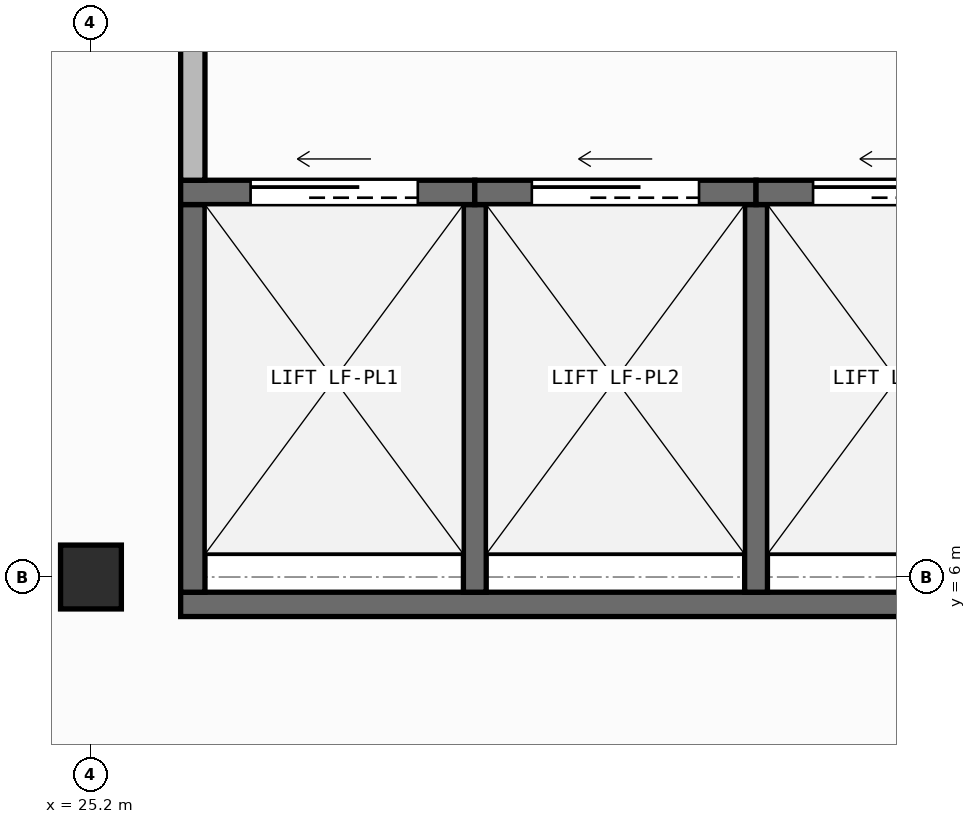
"""IFC4 building model, lengths in metres.
Left out: names, types, materials, properties, quantities, classifications, styles, units other than length and angle.
Written with IfcOpenShell. Run it as: python <this file> out.ifc"""

import sys

from ifc_helpers import new_model, si_unit, direction, frame, frame_2d, origin, origin_2d, place, context, subcontext, project, spatial, rectangle, i_section, extrude, element, fill, save


model = new_model("IFC4")
c1 = context("Model", 3, precision=1e-05, world=origin(), true_north=direction((0.0, 1.0)))
c2 = subcontext(c1, "Body", "Model", "MODEL_VIEW")
j1 = project(units=[si_unit("LENGTHUNIT", "METRE"), si_unit("PLANEANGLEUNIT", "RADIAN")], contexts=[c1])
p1 = place(None, origin())
s1 = spatial("IfcSite", under=j1, at=p1, CompositionType="ELEMENT")
p2 = place(p1, origin())
s2 = spatial("IfcBuilding", under=s1, at=p2, CompositionType="ELEMENT")
p3 = place(p2, frame((0.0, 0.0, 13.5)))
s3 = spatial("IfcBuildingStorey", under=s2, at=p3, CompositionType="ELEMENT", Elevation=13.5)
p4 = place(p3, frame((25.2, 6.0, 0.0), z_axis=(0.0, 0.0, 1.0), x_axis=(1.0, 0.0, 0.0)))
e1 = element("IfcColumn", 1, at=p4, inside=s3, PredefinedType="COLUMN", context=c2, shape_type="SweptSolid", body=[
    extrude(i_section(OverallWidth=0.4, OverallDepth=0.42, WebThickness=0.025, FlangeThickness=0.04, at=origin_2d()), origin(), (0.0, 0.0, 1.0), 4.5),
])
p5 = place(p3, frame((25.79, 5.82, 0.0), z_axis=(0.0, 0.0, 1.0), x_axis=(1.0, 0.0, 0.0)))
e2 = element("IfcWall", 2, at=p5, inside=s3, PredefinedType="SHEAR", context=c2, shape_type="SweptSolid", body=[
    extrude(rectangle(XDim=5.72, YDim=0.16, at=frame_2d((2.86, 0.0))), origin(), (0.0, 0.0, 1.0), 4.25),
])
p6 = place(p3, frame((25.87, 5.9, 0.0), z_axis=(0.0, 0.0, 1.0), x_axis=(0.0, 1.0, 0.0)))
e3 = element("IfcWall", 3, at=p6, inside=s3, PredefinedType="SHEAR", context=c2, shape_type="SweptSolid", body=[
    extrude(rectangle(XDim=2.55, YDim=0.16, at=frame_2d((1.275, 0.0))), origin(), (0.0, 0.0, 1.0), 4.25),
])
for number, where, z_axis, x_axis in (
    (4, (27.725, 5.9, 0.0), (0.0, 0.0, 1.0), (0.0, 1.0, 0.0)),
    (5, (29.575, 5.9, 0.0), (0.0, 0.0, 1.0), (0.0, 1.0, 0.0)),
):
    element("IfcWall", number, at=place(p3, frame(where, z_axis=z_axis, x_axis=x_axis)), inside=s3, PredefinedType="SHEAR", context=c2, shape_type="SweptSolid", body=[
        extrude(rectangle(XDim=2.55, YDim=0.15, at=frame_2d((1.275, 0.0))), origin(), (0.0, 0.0, 1.0), 4.25),
    ])
p7 = place(p3, frame((25.79, 8.53, 0.0), z_axis=(0.0, 0.0, 1.0), x_axis=(1.0, 0.0, 0.0)))
e6 = element("IfcWall", 6, at=p7, inside=s3, PredefinedType="SHEAR", context=c2, shape_type="SweptSolid", body=[
    extrude(rectangle(XDim=1.935, YDim=0.16, at=frame_2d((0.968, 0.0))), origin(), (0.0, 0.0, 1.0), 4.25),
])
p8 = place(p7, frame((0.46, 0.0, 0.0)))
e7 = element("IfcOpeningElement", 7, at=p8, cuts=e6, PredefinedType="OPENING", context=c2, shape_type="SweptSolid", body=[
    extrude(rectangle(XDim=1.1, YDim=2.15, at=frame_2d((0.55, 1.075))), frame((0.0, 0.09, 0.0), z_axis=(0.0, -1.0, 0.0), x_axis=(1.0, 0.0, 0.0)), (0.0, 0.0, 1.0), 0.18),
])
p9 = place(p3, frame((27.725, 8.53, 0.0), z_axis=(0.0, 0.0, 1.0), x_axis=(1.0, 0.0, 0.0)))
e8 = element("IfcWall", 8, at=p9, inside=s3, PredefinedType="SHEAR", context=c2, shape_type="SweptSolid", body=[
    extrude(rectangle(XDim=1.85, YDim=0.16, at=frame_2d((0.925, 0.0))), origin(), (0.0, 0.0, 1.0), 4.25),
])
p10 = place(p9, frame((0.375, 0.0, 0.0)))
e9 = element("IfcOpeningElement", 9, at=p10, cuts=e8, PredefinedType="OPENING", context=c2, shape_type="SweptSolid", body=[
    extrude(rectangle(XDim=1.1, YDim=2.15, at=frame_2d((0.55, 1.075))), frame((0.0, 0.09, 0.0), z_axis=(0.0, -1.0, 0.0), x_axis=(1.0, 0.0, 0.0)), (0.0, 0.0, 1.0), 0.18),
])
p11 = place(p3, frame((29.575, 8.53, 0.0), z_axis=(0.0, 0.0, 1.0), x_axis=(1.0, 0.0, 0.0)))
e10 = element("IfcWall", 10, at=p11, inside=s3, PredefinedType="SHEAR", context=c2, shape_type="SweptSolid", body=[
    extrude(rectangle(XDim=1.935, YDim=0.16, at=frame_2d((0.968, 0.0))), origin(), (0.0, 0.0, 1.0), 4.25),
])
p12 = place(p11, frame((0.375, 0.0, 0.0)))
e11 = element("IfcOpeningElement", 11, at=p12, cuts=e10, PredefinedType="OPENING", context=c2, shape_type="SweptSolid", body=[
    extrude(rectangle(XDim=1.1, YDim=2.15, at=frame_2d((0.55, 1.075))), frame((0.0, 0.09, 0.0), z_axis=(0.0, -1.0, 0.0), x_axis=(1.0, 0.0, 0.0)), (0.0, 0.0, 1.0), 0.18),
])
p13 = place(p3, frame((25.87, 8.61, 0.0), z_axis=(0.0, 0.0, 1.0), x_axis=(0.0, 1.0, 0.0)))
e12 = element("IfcWall", 12, at=p13, inside=s3, PredefinedType="PARTITIONING", context=c2, shape_type="SweptSolid", body=[
    extrude(rectangle(XDim=3.39, YDim=0.16, at=frame_2d((1.695, 0.0))), origin(), (0.0, 0.0, 1.0), 4.25),
])
p14 = place(p8, origin())
e13 = element("IfcDoor", 13, at=p14, inside=s3, OperationType="SLIDING_TO_LEFT", PredefinedType="DOOR", context=c2, shape_type="SweptSolid", body=[
    extrude(rectangle(XDim=1.1, YDim=2.15, at=frame_2d((0.55, 1.075))), frame((0.0, 0.025, 0.0), z_axis=(0.0, -1.0, 0.0), x_axis=(1.0, 0.0, 0.0)), (0.0, 0.0, 1.0), 0.05),
])
fill(e7, e13)
p15 = place(p10, origin())
e14 = element("IfcDoor", 14, at=p15, inside=s3, OperationType="SLIDING_TO_LEFT", PredefinedType="DOOR", context=c2, shape_type="SweptSolid", body=[
    extrude(rectangle(XDim=1.1, YDim=2.15, at=frame_2d((0.55, 1.075))), frame((0.0, 0.025, 0.0), z_axis=(0.0, -1.0, 0.0), x_axis=(1.0, 0.0, 0.0)), (0.0, 0.0, 1.0), 0.05),
])
fill(e9, e14)
p16 = place(p12, origin())
e15 = element("IfcDoor", 15, at=p16, inside=s3, OperationType="SLIDING_TO_LEFT", PredefinedType="DOOR", context=c2, shape_type="SweptSolid", body=[
    extrude(rectangle(XDim=1.1, YDim=2.15, at=frame_2d((0.55, 1.075))), frame((0.0, 0.025, 0.0), z_axis=(0.0, -1.0, 0.0), x_axis=(1.0, 0.0, 0.0)), (0.0, 0.0, 1.0), 0.05),
])
fill(e11, e15)
save(model, sys.argv[1])
